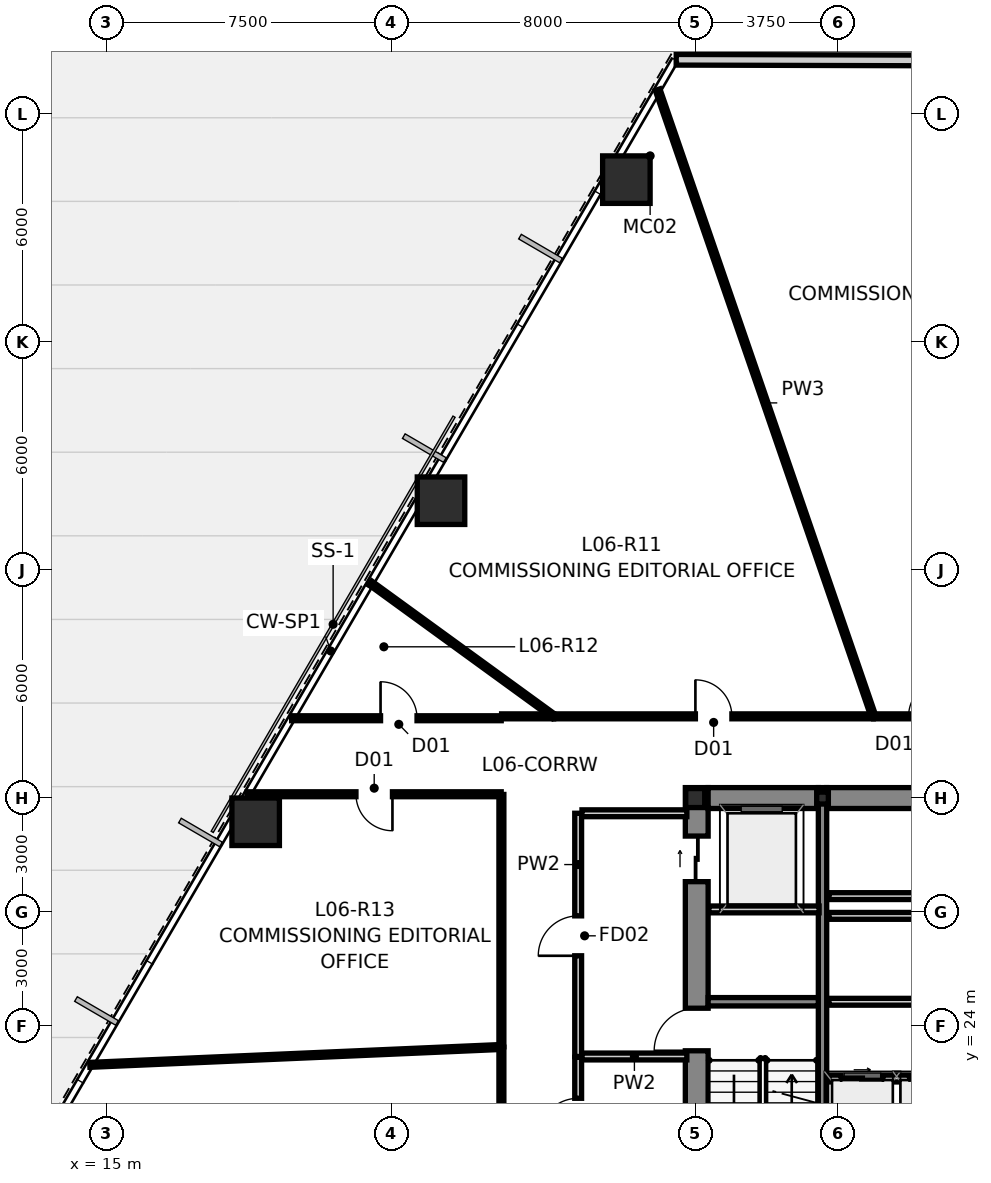
"""IFC4 building model, lengths in metres.
Left out: names, types, materials, properties, quantities, classifications, styles, units other than length and angle.
Written with IfcOpenShell. Run it as: python <this file> out.ifc"""

import sys

from ifc_helpers import new_model, si_unit, direction, frame, frame_2d, origin, origin_2d, place, context, subcontext, project, spatial, rectangle, hollow_rectangle, i_section, extrude, source, transform, mapped, element, fill, save


model = new_model("IFC4")
c1 = context("Model", 3, precision=1e-05, world=origin(), true_north=direction((0.0, 1.0)))
c2 = subcontext(c1, "Body", "Model", "MODEL_VIEW")
j1 = project(units=[si_unit("LENGTHUNIT", "METRE"), si_unit("PLANEANGLEUNIT", "RADIAN")], contexts=[c1])
p1 = place(None, origin())
s1 = spatial("IfcSite", under=j1, at=p1, CompositionType="ELEMENT")
p2 = place(p1, origin())
s2 = spatial("IfcBuilding", under=s1, at=p2, CompositionType="ELEMENT")
p3 = place(p2, frame((0.0, 0.0, 27.6)))
s3 = spatial("IfcBuildingStorey", under=s2, at=p3, CompositionType="ELEMENT", Elevation=27.6)
m1 = source(origin(), c2, "Body", "SweptSolid", [
    extrude(i_section(OverallWidth=0.5, OverallDepth=0.5, WebThickness=0.028, FlangeThickness=0.04, at=origin_2d()), origin(), (0.0, 0.0, 1.0), 3.65),
])
p4 = place(p3, frame((30.5, 30.0, 0.0), z_axis=(0.0, 0.0, 1.0), x_axis=(1.0, 0.0, 0.0)))
e1 = element("IfcColumn", 1, at=p4, inside=s3, PredefinedType="COLUMN", context=c2, shape_type="MappedRepresentation", body=[
    mapped(m1, transform((0.0, 0.0, 0.0), scale=1.0)),
])
m2 = source(origin(), c2, "Body", "SweptSolid", [
    extrude(i_section(OverallWidth=0.307, OverallDepth=0.315, WebThickness=0.012, FlangeThickness=0.019, at=origin_2d()), origin(), (0.0, 0.0, 1.0), 3.65),
])
p5 = place(p3, frame((33.85, 30.0, 0.0), z_axis=(0.0, 0.0, 1.0), x_axis=(1.0, 0.0, 0.0)))
e2 = element("IfcColumn", 2, at=p5, inside=s3, PredefinedType="COLUMN", context=c2, shape_type="MappedRepresentation", body=[
    mapped(m2, transform((0.0, 0.0, 0.0), scale=1.0)),
])
p6 = place(p3, frame((30.54, 16.85, 0.0), z_axis=(0.0, 0.0, 1.0), x_axis=(0.0, 1.0, 0.0)))
e3 = element("IfcWall", 3, at=p6, inside=s3, PredefinedType="SHEAR", context=c2, shape_type="SweptSolid", body=[
    extrude(rectangle(XDim=13.425, YDim=0.6, at=frame_2d((6.712, 0.0))), origin(), (0.0, 0.0, 1.0), 3.65),
])
p7 = place(p6, frame((6.5, 0.0, 0.0)))
e4 = element("IfcOpeningElement", 4, at=p7, cuts=e3, PredefinedType="OPENING", context=c2, shape_type="SweptSolid", body=[
    extrude(rectangle(XDim=1.12, YDim=2.15, at=frame_2d((0.56, 1.075))), frame((0.0, 0.312, 0.0), z_axis=(0.0, -1.0, 0.0), x_axis=(1.0, 0.0, 0.0)), (0.0, 0.0, 1.0), 0.624),
])
p8 = place(p6, frame((10.95, 0.0, 0.0)))
e5 = element("IfcOpeningElement", 5, at=p8, cuts=e3, PredefinedType="OPENING", context=c2, shape_type="SweptSolid", body=[
    extrude(rectangle(XDim=1.2, YDim=2.2, at=frame_2d((0.6, 1.1))), frame((0.0, 0.312, 0.0), z_axis=(0.0, -1.0, 0.0), x_axis=(1.0, 0.0, 0.0)), (0.0, 0.0, 1.0), 0.624),
])
p9 = place(p3, frame((30.84, 30.0, 0.0), z_axis=(0.0, 0.0, 1.0), x_axis=(1.0, 0.0, 0.0)))
e6 = element("IfcWall", 6, at=p9, inside=s3, PredefinedType="SHEAR", context=c2, shape_type="SweptSolid", body=[
    extrude(rectangle(XDim=2.9, YDim=0.55, at=frame_2d((1.45, 0.0))), origin(), (0.0, 0.0, 1.0), 3.65),
])
p10 = place(p3, frame((33.96, 30.0, 0.0), z_axis=(0.0, 0.0, 1.0), x_axis=(1.0, 0.0, 0.0)))
e7 = element("IfcWall", 7, at=p10, inside=s3, PredefinedType="SHEAR", context=c2, shape_type="SweptSolid", body=[
    extrude(rectangle(XDim=3.78, YDim=0.55, at=frame_2d((1.89, 0.0))), origin(), (0.0, 0.0, 1.0), 3.65),
])
p11 = place(p3, frame((33.85, 16.85, 0.0), z_axis=(0.0, 0.0, 1.0), x_axis=(0.0, 1.0, 0.0)))
e8 = element("IfcWall", 8, at=p11, inside=s3, PredefinedType="SHEAR", context=c2, shape_type="SweptSolid", body=[
    extrude(rectangle(XDim=13.425, YDim=0.22, at=frame_2d((6.712, 0.0))), origin(), (0.0, 0.0, 1.0), 3.65),
])
p12 = place(p3, frame((30.84, 24.64, 0.0), z_axis=(0.0, 0.0, 1.0), x_axis=(1.0, 0.0, 0.0)))
e9 = element("IfcWall", 9, at=p12, inside=s3, PredefinedType="SHEAR", context=c2, shape_type="SweptSolid", body=[
    extrude(rectangle(XDim=2.9, YDim=0.22, at=frame_2d((1.45, 0.0))), origin(), (0.0, 0.0, 1.0), 3.65),
])
m3 = source(origin(), c2, "Body", "SweptSolid", [
    extrude(hollow_rectangle(XDim=1.25, YDim=1.25, WallThickness=0.07, at=origin_2d()), origin(), (0.0, 0.0, 1.0), 3.651),
])
p13 = place(p3, frame((28.688, 46.272, 0.0), z_axis=(0.023872756997, 0.001738632162, 0.999713493273), x_axis=(-0.07263675076, 0.997358462359, 0.0)))
e10 = element("IfcColumn", 10, at=p13, inside=s3, PredefinedType="COLUMN", context=c2, shape_type="MappedRepresentation", body=[
    mapped(m3, transform((0.0, 0.0, 0.0), scale=1.0)),
])
m4 = source(origin(), c2, "Body", "SweptSolid", [
    extrude(hollow_rectangle(XDim=1.25, YDim=1.25, WallThickness=0.07, at=origin_2d()), origin(), (0.0, 0.0, 1.0), 3.901),
])
p14 = place(p3, frame((23.811, 37.824, -0.25), z_axis=(0.018151222073, -0.005633137885, 0.999819384136), x_axis=(0.296399214872, 0.955064136811, 0.0)))
e11 = element("IfcColumn", 11, at=p14, inside=s3, PredefinedType="COLUMN", context=c2, shape_type="MappedRepresentation", body=[
    mapped(m4, transform((0.0, 0.0, 0.0), scale=1.0)),
])
m5 = source(origin(), c2, "Body", "SweptSolid", [
    extrude(hollow_rectangle(XDim=1.25, YDim=1.25, WallThickness=0.07, at=origin_2d()), origin(), (0.0, 0.0, 1.0), 3.651),
])
p15 = place(p3, frame((18.934, 29.376, 0.0), z_axis=(0.014913313399, -0.013776424037, 0.999793880369), x_axis=(0.678553674548, 0.734550822447, 0.0)))
e12 = element("IfcColumn", 12, at=p15, inside=s3, PredefinedType="COLUMN", context=c2, shape_type="MappedRepresentation", body=[
    mapped(m5, transform((0.0, 0.0, 0.0), scale=1.0)),
])
p16 = place(p3, frame((30.0, 49.426, 0.0), z_axis=(0.0, 0.0, 1.0), x_axis=(0.999996469255, -0.002657343894, 0.0)))
e13 = element("IfcWall", 13, at=p16, inside=s3, PredefinedType="STANDARD", context=c2, shape_type="SweptSolid", body=[
    extrude(rectangle(XDim=16.078, YDim=0.28, at=frame_2d((8.039, 0.0))), origin(), (0.0, 0.0, 1.0), 3.4),
])
p17 = place(p16, frame((7.14, 0.0, 0.9)))
e14 = element("IfcOpeningElement", 14, at=p17, cuts=e13, PredefinedType="OPENING", context=c2, shape_type="SweptSolid", body=[
    extrude(rectangle(XDim=1.8, YDim=1.8, at=frame_2d((0.9, 0.9))), frame((0.0, 0.152, 0.0), z_axis=(0.0, -1.0, 0.0), x_axis=(1.0, 0.0, 0.0)), (0.0, 0.0, 1.0), 0.304),
])
p18 = place(p3, frame((34.02, 22.62, 0.0), z_axis=(0.0, 0.0, 1.0), x_axis=(1.0, 0.0, 0.0)))
e15 = element("IfcWall", 15, at=p18, inside=s3, PredefinedType="PARTITIONING", context=c2, shape_type="SweptSolid", body=[
    extrude(rectangle(XDim=3.6, YDim=0.18, at=frame_2d((1.8, 0.0))), origin(), (0.0, 0.0, 1.0), 3.4),
])
p19 = place(p18, frame((0.32, 0.0, 0.0)))
e16 = element("IfcOpeningElement", 16, at=p19, cuts=e15, PredefinedType="OPENING", context=c2, shape_type="SweptSolid", body=[
    extrude(rectangle(XDim=1.1, YDim=2.2, at=frame_2d((0.55, 1.1))), frame((0.0, 0.102, 0.0), z_axis=(0.0, -1.0, 0.0), x_axis=(1.0, 0.0, 0.0)), (0.0, 0.0, 1.0), 0.204),
])
p20 = place(p18, frame((2.12, 0.0, 0.0)))
e17 = element("IfcOpeningElement", 17, at=p20, cuts=e15, PredefinedType="OPENING", context=c2, shape_type="SweptSolid", body=[
    extrude(rectangle(XDim=1.1, YDim=2.2, at=frame_2d((0.55, 1.1))), frame((0.0, 0.102, 0.0), z_axis=(0.0, -1.0, 0.0), x_axis=(1.0, 0.0, 0.0)), (0.0, 0.0, 1.0), 0.204),
])
p21 = place(p3, frame((34.02, 26.9, 0.0), z_axis=(0.0, 0.0, 1.0), x_axis=(1.0, 0.0, 0.0)))
e18 = element("IfcWall", 18, at=p21, inside=s3, PredefinedType="PARTITIONING", context=c2, shape_type="SweptSolid", body=[
    extrude(rectangle(XDim=3.6, YDim=0.18, at=frame_2d((1.8, 0.0))), origin(), (0.0, 0.0, 1.0), 3.4),
])
p22 = place(p3, frame((34.02, 24.64, 0.0), z_axis=(0.0, 0.0, 1.0), x_axis=(1.0, 0.0, 0.0)))
e19 = element("IfcWall", 19, at=p22, inside=s3, PredefinedType="PARTITIONING", context=c2, shape_type="SweptSolid", body=[
    extrude(rectangle(XDim=3.68, YDim=0.18, at=frame_2d((1.84, 0.0))), origin(), (0.0, 0.0, 1.0), 3.4),
])
p23 = place(p3, frame((34.02, 27.42, 0.0), z_axis=(0.0, 0.0, 1.0), x_axis=(1.0, 0.0, 0.0)))
e20 = element("IfcWall", 20, at=p23, inside=s3, PredefinedType="PARTITIONING", context=c2, shape_type="SweptSolid", body=[
    extrude(rectangle(XDim=3.66, YDim=0.18, at=frame_2d((1.83, 0.0))), origin(), (0.0, 0.0, 1.0), 3.4),
])
p24 = place(p3, frame((27.42, 23.2, 0.0), z_axis=(0.0, 0.0, 1.0), x_axis=(0.0, 1.0, 0.0)))
e21 = element("IfcWall", 21, at=p24, inside=s3, PredefinedType="PARTITIONING", context=c2, shape_type="SweptSolid", body=[
    extrude(rectangle(XDim=6.4, YDim=0.18, at=frame_2d((3.2, 0.0))), origin(), (0.0, 0.0, 1.0), 3.4),
])
p25 = place(p24, frame((2.65, 0.0, 0.0)))
e22 = element("IfcOpeningElement", 22, at=p25, cuts=e21, PredefinedType="OPENING", context=c2, shape_type="SweptSolid", body=[
    extrude(rectangle(XDim=1.05, YDim=2.15, at=frame_2d((0.525, 1.075))), frame((0.0, 0.102, 0.0), z_axis=(0.0, -1.0, 0.0), x_axis=(1.0, 0.0, 0.0)), (0.0, 0.0, 1.0), 0.204),
])
p26 = place(p3, frame((27.52, 23.2, 0.0), z_axis=(0.0, 0.0, 1.0), x_axis=(1.0, 0.0, 0.0)))
e23 = element("IfcWall", 23, at=p26, inside=s3, PredefinedType="PARTITIONING", context=c2, shape_type="SweptSolid", body=[
    extrude(rectangle(XDim=2.76, YDim=0.18, at=frame_2d((1.38, 0.0))), origin(), (0.0, 0.0, 1.0), 3.4),
])
p27 = place(p3, frame((27.52, 29.6, 0.0), z_axis=(0.0, 0.0, 1.0), x_axis=(1.0, 0.0, 0.0)))
e24 = element("IfcWall", 24, at=p27, inside=s3, PredefinedType="PARTITIONING", context=c2, shape_type="SweptSolid", body=[
    extrude(rectangle(XDim=2.76, YDim=0.18, at=frame_2d((1.38, 0.0))), origin(), (0.0, 0.0, 1.0), 2.783),
])
p28 = place(p3, frame((30.86, 27.07, 0.0), z_axis=(0.0, 0.0, 1.0), x_axis=(1.0, 0.0, 0.0)))
e25 = element("IfcWall", 25, at=p28, inside=s3, PredefinedType="PARTITIONING", context=c2, shape_type="SweptSolid", body=[
    extrude(rectangle(XDim=2.9, YDim=0.18, at=frame_2d((1.45, 0.0))), origin(), (0.0, 0.0, 1.0), 3.4),
])
p29 = place(p3, frame((27.42, 17.15, 0.0), z_axis=(0.0, 0.0, 1.0), x_axis=(0.0, 1.0, 0.0)))
e26 = element("IfcWall", 26, at=p29, inside=s3, PredefinedType="PARTITIONING", context=c2, shape_type="SweptSolid", body=[
    extrude(rectangle(XDim=6.03, YDim=0.18, at=frame_2d((3.015, 0.0))), origin(), (0.0, 0.0, 1.0), 3.026),
])
p30 = place(p29, frame((0.9, 0.0, 0.0)))
e27 = element("IfcOpeningElement", 27, at=p30, cuts=e26, PredefinedType="OPENING", context=c2, shape_type="SweptSolid", body=[
    extrude(rectangle(XDim=1.05, YDim=2.15, at=frame_2d((0.525, 1.075))), frame((0.0, 0.102, 0.0), z_axis=(0.0, -1.0, 0.0), x_axis=(1.0, 0.0, 0.0)), (0.0, 0.0, 1.0), 0.204),
])
p31 = place(p29, frame((3.9, 0.0, 0.0)))
e28 = element("IfcOpeningElement", 28, at=p31, cuts=e26, PredefinedType="OPENING", context=c2, shape_type="SweptSolid", body=[
    extrude(rectangle(XDim=1.05, YDim=2.15, at=frame_2d((0.525, 1.075))), frame((0.0, 0.102, 0.0), z_axis=(0.0, -1.0, 0.0), x_axis=(1.0, 0.0, 0.0)), (0.0, 0.0, 1.0), 0.204),
])
p32 = place(p3, frame((29.51, 48.64, 0.0), z_axis=(0.0, 0.0, 1.0), x_axis=(0.325659673982, -0.945487057945, 0.0)))
e29 = element("IfcWall", 29, at=p32, inside=s3, PredefinedType="PARTITIONING", context=c2, shape_type="SweptSolid", body=[
    extrude(rectangle(XDim=17.435, YDim=0.13, at=frame_2d((8.718, 0.0))), origin(), (0.0, 0.0, 1.0), 3.4),
])
p33 = place(p3, frame((14.57, 22.98, 0.0), z_axis=(0.0, 0.0, 1.0), x_axis=(0.999058877274, 0.043374643965, 0.0)))
e30 = element("IfcWall", 30, at=p33, inside=s3, PredefinedType="PARTITIONING", context=c2, shape_type="SweptSolid", body=[
    extrude(rectangle(XDim=10.835, YDim=0.13, at=frame_2d((5.417, 0.0))), origin(), (0.0, 0.0, 1.0), 3.4),
])
p34 = place(p3, frame((26.785, 32.15, 0.0), z_axis=(0.0, 0.0, 1.0), x_axis=(1.0, 0.0, 0.0)))
e31 = element("IfcWall", 31, at=p34, inside=s3, PredefinedType="PARTITIONING", context=c2, shape_type="SweptSolid", body=[
    extrude(rectangle(XDim=8.4, YDim=0.13, at=frame_2d((4.2, 0.0))), origin(), (0.0, 0.0, 1.0), 3.4),
])
p35 = place(p34, frame((3.72, 0.0, 0.0)))
e32 = element("IfcOpeningElement", 32, at=p35, cuts=e31, PredefinedType="OPENING", context=c2, shape_type="SweptSolid", body=[
    extrude(rectangle(XDim=0.96, YDim=2.15, at=frame_2d((0.48, 1.075))), frame((0.0, 0.077, 0.0), z_axis=(0.0, -1.0, 0.0), x_axis=(1.0, 0.0, 0.0)), (0.0, 0.0, 1.0), 0.154),
])
p36 = place(p3, frame((25.395, 30.1, 0.0), z_axis=(0.0, 0.0, 1.0), x_axis=(-1.0, 0.0, 0.0)))
e33 = element("IfcWall", 33, at=p36, inside=s3, PredefinedType="PARTITIONING", context=c2, shape_type="SweptSolid", body=[
    extrude(rectangle(XDim=6.685, YDim=0.13, at=frame_2d((3.343, 0.0))), origin(), (0.0, 0.0, 1.0), 2.783),
])
p37 = place(p36, frame((2.862, 0.0, 0.0)))
e34 = element("IfcOpeningElement", 34, at=p37, cuts=e33, PredefinedType="OPENING", context=c2, shape_type="SweptSolid", body=[
    extrude(rectangle(XDim=0.96, YDim=2.15, at=frame_2d((0.48, 1.075))), frame((0.0, 0.077, 0.0), z_axis=(0.0, -1.0, 0.0), x_axis=(1.0, 0.0, 0.0)), (0.0, 0.0, 1.0), 0.154),
])
p38 = place(p3, frame((25.4, 23.455, 0.0), z_axis=(0.0, 0.0, 1.0), x_axis=(0.0, 1.0, 0.0)))
e35 = element("IfcWall", 35, at=p38, inside=s3, PredefinedType="PARTITIONING", context=c2, shape_type="SweptSolid", body=[
    extrude(rectangle(XDim=6.64, YDim=0.13, at=frame_2d((3.32, 0.0))), origin(), (0.0, 0.0, 1.0), 3.026),
])
p39 = place(p3, frame((25.4, 17.105, 0.0), z_axis=(0.0, 0.0, 1.0), x_axis=(0.0, 1.0, 0.0)))
e36 = element("IfcWall", 36, at=p39, inside=s3, PredefinedType="PARTITIONING", context=c2, shape_type="SweptSolid", body=[
    extrude(rectangle(XDim=6.34, YDim=0.13, at=frame_2d((3.17, 0.0))), origin(), (0.0, 0.0, 1.0), 3.026),
])
p40 = place(p3, frame((21.95, 35.66, 0.0), z_axis=(0.0, 0.0, 1.0), x_axis=(0.808969626328, -0.587850443293, 0.0)))
e37 = element("IfcWall", 37, at=p40, inside=s3, PredefinedType="PARTITIONING", context=c2, shape_type="SweptSolid", body=[
    extrude(rectangle(XDim=5.966, YDim=0.13, at=frame_2d((2.983, 0.0))), origin(), (0.0, 0.0, 1.0), 3.4),
])
p41 = place(p3, frame((19.88, 32.1, 0.0), z_axis=(0.0, 0.0, 1.0), x_axis=(1.0, 0.0, 0.0)))
e38 = element("IfcWall", 38, at=p41, inside=s3, PredefinedType="PARTITIONING", context=c2, shape_type="SweptSolid", body=[
    extrude(rectangle(XDim=5.515, YDim=0.13, at=frame_2d((2.758, 0.0))), origin(), (0.0, 0.0, 1.0), 3.4),
])
p42 = place(p41, frame((2.34, 0.0, 0.0)))
e39 = element("IfcOpeningElement", 39, at=p42, cuts=e38, PredefinedType="OPENING", context=c2, shape_type="SweptSolid", body=[
    extrude(rectangle(XDim=0.96, YDim=2.15, at=frame_2d((0.48, 1.075))), frame((0.0, 0.077, 0.0), z_axis=(0.0, -1.0, 0.0), x_axis=(1.0, 0.0, 0.0)), (0.0, 0.0, 1.0), 0.154),
])
p43 = place(p3, frame((35.195, 32.15, 0.0), z_axis=(0.0, 0.0, 1.0), x_axis=(1.0, 0.0, 0.0)))
e40 = element("IfcWall", 40, at=p43, inside=s3, PredefinedType="PARTITIONING", context=c2, shape_type="SweptSolid", body=[
    extrude(rectangle(XDim=2.8, YDim=0.13, at=frame_2d((1.4, 0.0))), origin(), (0.0, 0.0, 1.0), 3.4),
])
p44 = place(p43, frame((0.92, 0.0, 0.0)))
e41 = element("IfcOpeningElement", 41, at=p44, cuts=e40, PredefinedType="OPENING", context=c2, shape_type="SweptSolid", body=[
    extrude(rectangle(XDim=0.96, YDim=2.15, at=frame_2d((0.48, 1.075))), frame((0.0, 0.077, 0.0), z_axis=(0.0, -1.0, 0.0), x_axis=(1.0, 0.0, 0.0)), (0.0, 0.0, 1.0), 0.154),
])
p45 = place(p3, frame((25.405, 32.15, 0.0), z_axis=(0.0, 0.0, 1.0), x_axis=(1.0, 0.0, 0.0)))
e42 = element("IfcWall", 42, at=p45, inside=s3, PredefinedType="PARTITIONING", context=c2, shape_type="SweptSolid", body=[
    extrude(rectangle(XDim=1.37, YDim=0.13, at=frame_2d((0.685, 0.0))), origin(), (0.0, 0.0, 1.0), 3.4),
])
p46 = place(p7, origin())
e43 = element("IfcDoor", 43, at=p46, inside=s3, OperationType="SINGLE_SWING_LEFT", PredefinedType="DOOR", context=c2, shape_type="SweptSolid", body=[
    extrude(rectangle(XDim=1.12, YDim=2.15, at=frame_2d((0.56, 1.075))), frame((0.0, 0.025, 0.0), z_axis=(0.0, -1.0, 0.0), x_axis=(1.0, 0.0, 0.0)), (0.0, 0.0, 1.0), 0.05),
])
fill(e4, e43)
p47 = place(p8, origin())
e44 = element("IfcDoor", 44, at=p47, inside=s3, OperationType="SLIDING_TO_LEFT", PredefinedType="DOOR", context=c2, shape_type="SweptSolid", body=[
    extrude(rectangle(XDim=1.2, YDim=2.2, at=frame_2d((0.6, 1.1))), frame((0.0, 0.025, 0.0), z_axis=(0.0, -1.0, 0.0), x_axis=(1.0, 0.0, 0.0)), (0.0, 0.0, 1.0), 0.05),
])
fill(e5, e44)
p48 = place(p19, origin())
e45 = element("IfcDoor", 45, at=p48, inside=s3, OperationType="SLIDING_TO_LEFT", PredefinedType="DOOR", context=c2, shape_type="SweptSolid", body=[
    extrude(rectangle(XDim=1.1, YDim=2.2, at=frame_2d((0.55, 1.1))), frame((0.0, 0.025, 0.0), z_axis=(0.0, -1.0, 0.0), x_axis=(1.0, 0.0, 0.0)), (0.0, 0.0, 1.0), 0.05),
])
fill(e16, e45)
p49 = place(p20, origin())
e46 = element("IfcDoor", 46, at=p49, inside=s3, OperationType="SLIDING_TO_RIGHT", PredefinedType="DOOR", context=c2, shape_type="SweptSolid", body=[
    extrude(rectangle(XDim=1.1, YDim=2.2, at=frame_2d((0.55, 1.1))), frame((0.0, 0.025, 0.0), z_axis=(0.0, -1.0, 0.0), x_axis=(1.0, 0.0, 0.0)), (0.0, 0.0, 1.0), 0.05),
])
fill(e17, e46)
p50 = place(p25, origin())
e47 = element("IfcDoor", 47, at=p50, inside=s3, OperationType="SINGLE_SWING_LEFT", PredefinedType="DOOR", context=c2, shape_type="SweptSolid", body=[
    extrude(rectangle(XDim=1.05, YDim=2.15, at=frame_2d((0.525, 1.075))), frame((0.0, 0.025, 0.0), z_axis=(0.0, -1.0, 0.0), x_axis=(1.0, 0.0, 0.0)), (0.0, 0.0, 1.0), 0.05),
])
fill(e22, e47)
p51 = place(p31, origin())
e48 = element("IfcDoor", 48, at=p51, inside=s3, OperationType="SINGLE_SWING_LEFT", PredefinedType="DOOR", context=c2, shape_type="SweptSolid", body=[
    extrude(rectangle(XDim=1.05, YDim=2.15, at=frame_2d((0.525, 1.075))), frame((0.0, 0.025, 0.0), z_axis=(0.0, -1.0, 0.0), x_axis=(1.0, 0.0, 0.0)), (0.0, 0.0, 1.0), 0.05),
])
fill(e28, e48)
p52 = place(p35, origin())
e49 = element("IfcDoor", 49, at=p52, inside=s3, OperationType="SINGLE_SWING_LEFT", PredefinedType="DOOR", context=c2, shape_type="SweptSolid", body=[
    extrude(rectangle(XDim=0.96, YDim=2.15, at=frame_2d((0.48, 1.075))), frame((0.0, 0.025, 0.0), z_axis=(0.0, -1.0, 0.0), x_axis=(1.0, 0.0, 0.0)), (0.0, 0.0, 1.0), 0.05),
])
fill(e32, e49)
p53 = place(p37, origin())
e50 = element("IfcDoor", 50, at=p53, inside=s3, OperationType="SINGLE_SWING_LEFT", PredefinedType="DOOR", context=c2, shape_type="SweptSolid", body=[
    extrude(rectangle(XDim=0.96, YDim=2.15, at=frame_2d((0.48, 1.075))), frame((0.0, 0.025, 0.0), z_axis=(0.0, -1.0, 0.0), x_axis=(1.0, 0.0, 0.0)), (0.0, 0.0, 1.0), 0.05),
])
fill(e34, e50)
p54 = place(p42, origin())
e51 = element("IfcDoor", 51, at=p54, inside=s3, OperationType="SINGLE_SWING_LEFT", PredefinedType="DOOR", context=c2, shape_type="SweptSolid", body=[
    extrude(rectangle(XDim=0.96, YDim=2.15, at=frame_2d((0.48, 1.075))), frame((0.0, 0.025, 0.0), z_axis=(0.0, -1.0, 0.0), x_axis=(1.0, 0.0, 0.0)), (0.0, 0.0, 1.0), 0.05),
])
fill(e39, e51)
p55 = place(p44, origin())
e52 = element("IfcDoor", 52, at=p55, inside=s3, OperationType="SINGLE_SWING_RIGHT", PredefinedType="DOOR", context=c2, shape_type="SweptSolid", body=[
    extrude(rectangle(XDim=0.96, YDim=2.15, at=frame_2d((0.48, 1.075))), frame((0.0, 0.025, 0.0), z_axis=(0.0, -1.0, 0.0), x_axis=(1.0, 0.0, 0.0)), (0.0, 0.0, 1.0), 0.05),
])
fill(e41, e52)
save(model, sys.argv[1])
